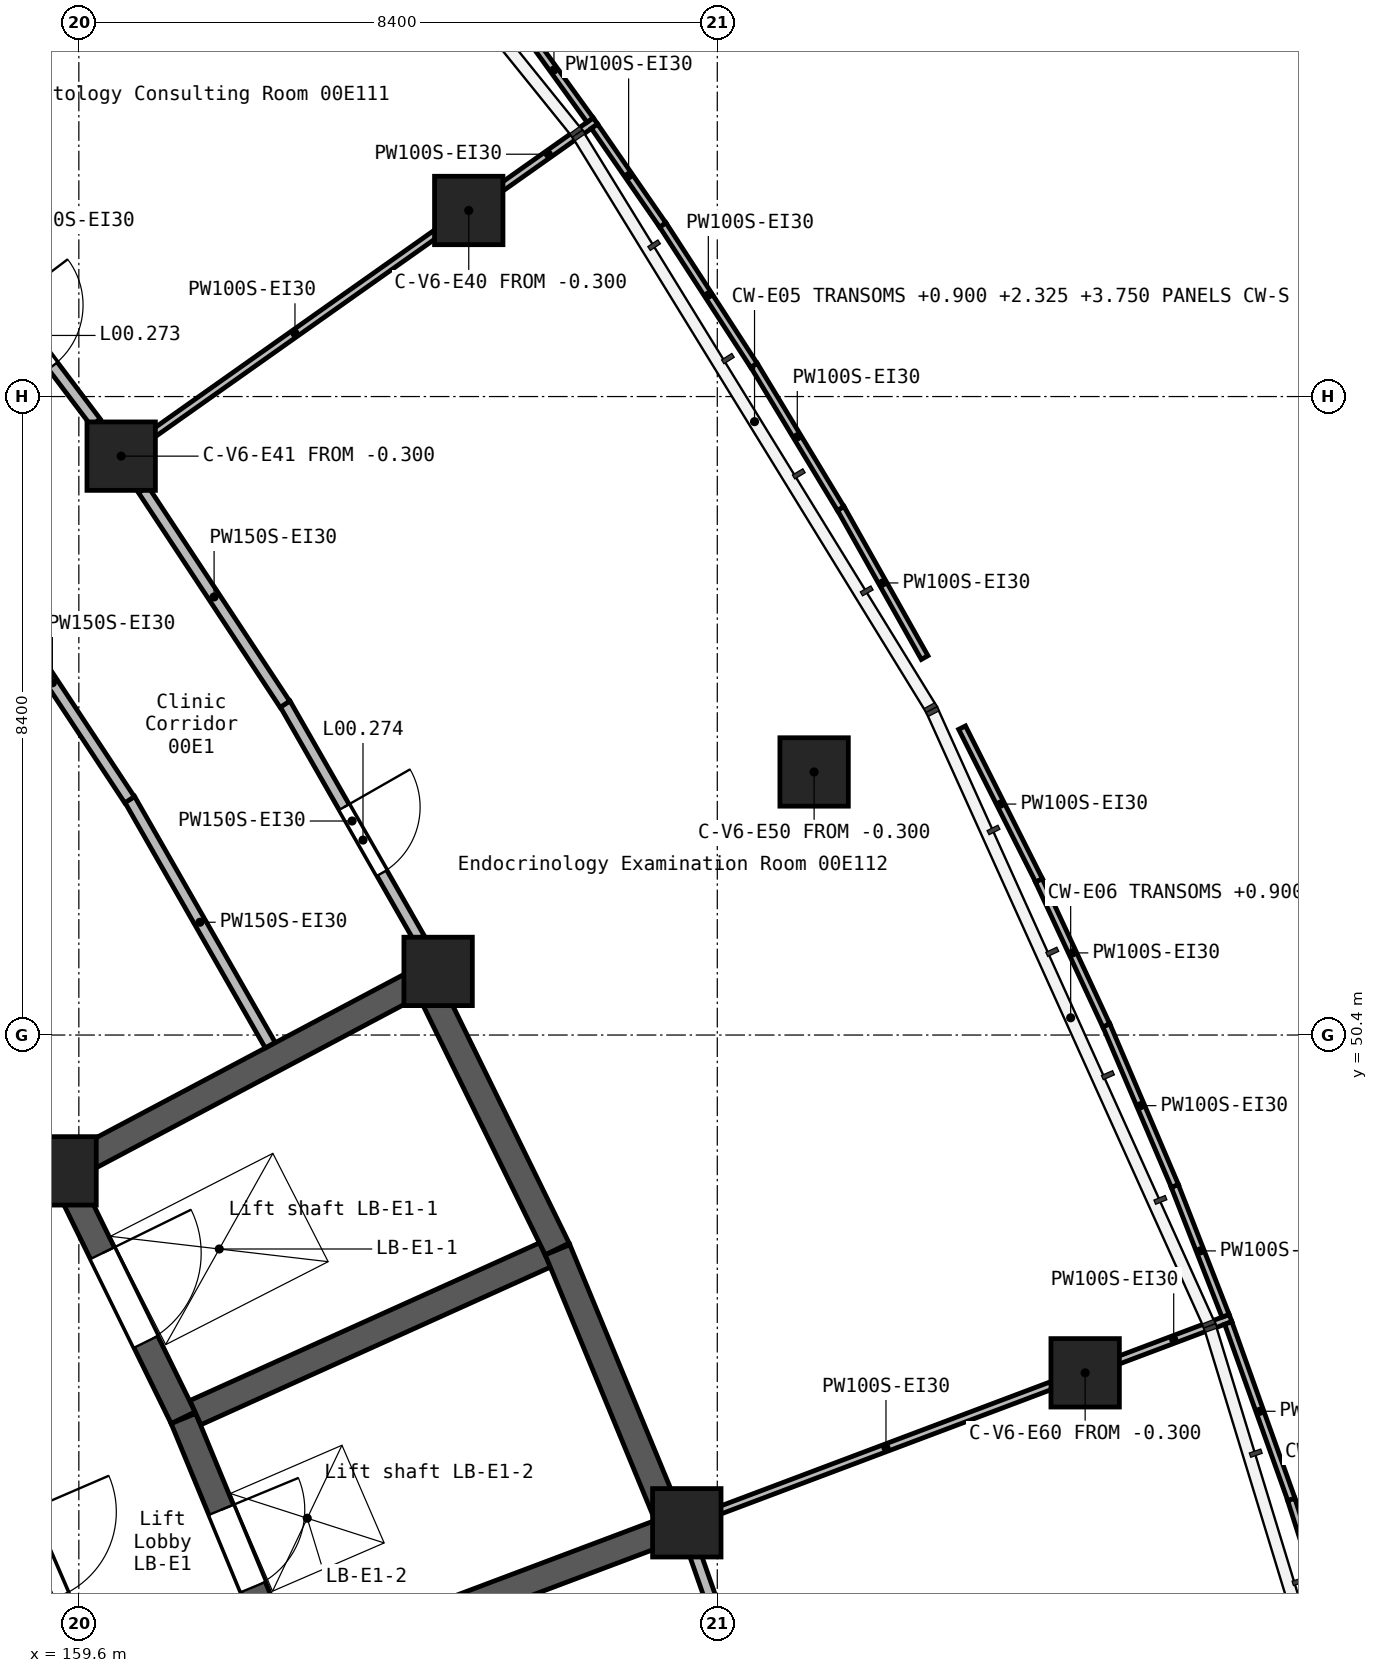
"""IFC4 building model, lengths in metres.
Left out: names, types, materials, properties, quantities, classifications, styles, units other than length and angle.
Written with IfcOpenShell. Run it as: python <this file> out.ifc"""

import sys

from ifc_helpers import new_model, si_unit, direction, frame, frame_2d, origin, origin_2d, place, context, subcontext, project, spatial, rectangle, extrude, element, fill, save


model = new_model("IFC4")
c1 = context("Model", 3, precision=1e-05, world=origin(), true_north=direction((0.0, 1.0)))
c2 = subcontext(c1, "Body", "Model", "MODEL_VIEW")
j1 = project(units=[si_unit("LENGTHUNIT", "METRE"), si_unit("PLANEANGLEUNIT", "RADIAN")], contexts=[c1])
p1 = place(None, origin())
s1 = spatial("IfcSite", under=j1, at=p1, CompositionType="ELEMENT")
p2 = place(p1, origin())
s2 = spatial("IfcBuilding", under=s1, at=p2, CompositionType="ELEMENT")
p3 = place(p2, origin())
s3 = spatial("IfcBuildingStorey", under=s2, at=p3, CompositionType="ELEMENT", Elevation=0.0)
for number, where, z_axis, x_axis in (
    (1, (159.379, 48.613, -0.3), (0.0, 0.0, 1.0), (1.0, 0.0, 0.0)),
    (2, (160.157, 58.016, -0.3), (0.0, 0.0, 1.0), (1.0, 0.0, 0.0)),
    (3, (164.327, 51.237, -0.3), (0.0, 0.0, 1.0), (1.0, 0.0, 0.0)),
    (4, (164.73, 61.248, -0.3), (0.0, 0.0, 1.0), (1.0, 0.0, 0.0)),
    (5, (167.599, 43.983, -0.3), (0.0, 0.0, 1.0), (1.0, 0.0, 0.0)),
    (6, (169.274, 53.861, -0.3), (0.0, 0.0, 1.0), (1.0, 0.0, 0.0)),
    (7, (172.84, 45.956, -0.3), (0.0, 0.0, 1.0), (1.0, 0.0, 0.0)),
):
    element("IfcColumn", number, at=place(p3, frame(where, z_axis=z_axis, x_axis=x_axis)), inside=s3, PredefinedType="COLUMN", context=c2, shape_type="SweptSolid", body=[
        extrude(rectangle(XDim=0.9, YDim=0.9, at=origin_2d()), origin(), (0.0, 0.0, 1.0), 5.7),
    ])
p4 = place(p3, frame((159.224, 48.531, -0.3), z_axis=(0.0, 0.0, 1.0), x_axis=(0.883393138637, 0.468632652094, 0.0)))
e8 = element("IfcWall", 8, at=p4, inside=s3, PredefinedType="SHEAR", context=c2, shape_type="SweptSolid", body=[
    extrude(rectangle(XDim=5.751, YDim=0.35, at=frame_2d((2.875, 0.0))), origin(), (0.0, 0.0, 1.0), 5.7),
])
p5 = place(p3, frame((159.456, 48.456, -0.3), z_axis=(0.0, 0.0, 1.0), x_axis=(0.440221126053, -0.89788939195, 0.0)))
e9 = element("IfcWall", 9, at=p5, inside=s3, PredefinedType="SHEAR", context=c2, shape_type="SweptSolid", body=[
    extrude(rectangle(XDim=3.442, YDim=0.35, at=frame_2d((1.721, 0.0))), origin(), (0.0, 0.0, 1.0), 5.7),
])
p6 = place(p5, frame((1.031, 0.0, 0.3)))
e10 = element("IfcOpeningElement", 10, at=p6, cuts=e9, PredefinedType="OPENING", context=c2, shape_type="SweptSolid", body=[
    extrude(rectangle(XDim=1.3, YDim=2.1, at=frame_2d((0.65, 1.05))), frame((0.0, 0.185, 0.0), z_axis=(0.0, -1.0, 0.0), x_axis=(1.0, 0.0, 0.0)), (0.0, 0.0, 1.0), 0.37),
])
p7 = place(p3, frame((160.976, 45.355, -0.3), z_axis=(0.0, 0.0, 1.0), x_axis=(0.381990591944, -0.924166212143, 0.0)))
e11 = element("IfcWall", 11, at=p7, inside=s3, PredefinedType="SHEAR", context=c2, shape_type="SweptSolid", body=[
    extrude(rectangle(XDim=3.443, YDim=0.35, at=frame_2d((1.721, 0.0))), origin(), (0.0, 0.0, 1.0), 5.7),
])
p8 = place(p7, frame((1.3, 0.0, 0.3)))
e12 = element("IfcOpeningElement", 12, at=p8, cuts=e11, PredefinedType="OPENING", context=c2, shape_type="SweptSolid", body=[
    extrude(rectangle(XDim=1.1, YDim=2.1, at=frame_2d((0.55, 1.05))), frame((0.0, 0.185, 0.0), z_axis=(0.0, -1.0, 0.0), x_axis=(1.0, 0.0, 0.0)), (0.0, 0.0, 1.0), 0.37),
])
p9 = place(p3, frame((161.134, 45.432, -0.3), z_axis=(0.0, 0.0, 1.0), x_axis=(0.911564728385, 0.411156595427, 0.0)))
e13 = element("IfcWall", 13, at=p9, inside=s3, PredefinedType="SHEAR", context=c2, shape_type="SweptSolid", body=[
    extrude(rectangle(XDim=5.05, YDim=0.35, at=frame_2d((2.525, 0.0))), origin(), (0.0, 0.0, 1.0), 5.7),
])
p10 = place(p3, frame((162.194, 41.949, -0.3), z_axis=(0.0, 0.0, 1.0), x_axis=(0.935920223106, 0.352212061095, 0.0)))
e14 = element("IfcWall", 14, at=p10, inside=s3, PredefinedType="SHEAR", context=c2, shape_type="SweptSolid", body=[
    extrude(rectangle(XDim=5.75, YDim=0.35, at=frame_2d((2.875, 0.0))), origin(), (0.0, 0.0, 1.0), 5.7),
])
p11 = place(p3, frame((165.894, 47.585, -0.3), z_axis=(0.0, 0.0, 1.0), x_axis=(-0.43992897418, 0.898032570499, 0.0)))
e15 = element("IfcWall", 15, at=p11, inside=s3, PredefinedType="SHEAR", context=c2, shape_type="SweptSolid", body=[
    extrude(rectangle(XDim=3.788, YDim=0.35, at=frame_2d((1.894, 0.0))), origin(), (0.0, 0.0, 1.0), 5.7),
])
p12 = place(p3, frame((167.345, 44.075, -0.3), z_axis=(0.0, 0.0, 1.0), x_axis=(-0.382046231428, 0.924143212415, 0.0)))
e16 = element("IfcWall", 16, at=p12, inside=s3, PredefinedType="SHEAR", context=c2, shape_type="SweptSolid", body=[
    extrude(rectangle(XDim=3.788, YDim=0.35, at=frame_2d((1.894, 0.0))), origin(), (0.0, 0.0, 1.0), 5.7),
])
p13 = place(p3, frame((158.747, 44.465, 0.0), z_axis=(0.0, 0.0, 1.0), x_axis=(0.396322487651, -0.918111368943, 0.0)))
e17 = element("IfcWall", 17, at=p13, inside=s3, PredefinedType="SOLIDWALL", context=c2, shape_type="SweptSolid", body=[
    extrude(rectangle(XDim=1.936, YDim=0.2, at=frame_2d((0.968, 0.0))), origin(), (0.0, 0.0, 1.0), 5.05),
])
p14 = place(p13, frame((0.368, 0.0, 0.0)))
e18 = element("IfcOpeningElement", 18, at=p14, cuts=e17, PredefinedType="OPENING", context=c2, shape_type="SweptSolid", body=[
    extrude(rectangle(XDim=1.2, YDim=2.1, at=frame_2d((0.6, 1.05))), frame((0.0, 0.11, 0.0), z_axis=(0.0, -1.0, 0.0), x_axis=(1.0, 0.0, 0.0)), (0.0, 0.0, 1.0), 0.22),
])
p15 = place(p3, frame((162.313, 54.758, 0.0), z_axis=(0.0, 0.0, 1.0), x_axis=(0.496582798362, -0.867989357291, 0.0)))
e19 = element("IfcWall", 19, at=p15, inside=s3, PredefinedType="PARTITIONING", context=c2, shape_type="SweptSolid", body=[
    extrude(rectangle(XDim=3.553, YDim=0.15, at=frame_2d((1.777, 0.0))), origin(), (0.0, 0.0, 1.0), 5.05),
])
p16 = place(p15, frame((1.566, 0.0, 0.0)))
e20 = element("IfcOpeningElement", 20, at=p16, cuts=e19, PredefinedType="OPENING", context=c2, shape_type="SweptSolid", body=[
    extrude(rectangle(XDim=1.0, YDim=2.1, at=frame_2d((0.5, 1.05))), frame((0.0, 0.085, 0.0), z_axis=(0.0, -1.0, 0.0), x_axis=(1.0, 0.0, 0.0)), (0.0, 0.0, 1.0), 0.17),
])
p17 = place(p3, frame((160.448, 57.575, 0.0), z_axis=(0.0, 0.0, 1.0), x_axis=(0.550814058929, -0.834627984485, 0.0)))
e21 = element("IfcWall", 21, at=p17, inside=s3, PredefinedType="PARTITIONING", context=c2, shape_type="SweptSolid", body=[
    extrude(rectangle(XDim=3.383, YDim=0.15, at=frame_2d((1.692, 0.0))), origin(), (0.0, 0.0, 1.0), 5.05),
])
p18 = place(p3, frame((157.712, 61.252, 0.0), z_axis=(0.0, 0.0, 1.0), x_axis=(0.602876520925, -0.797834506974, 0.0)))
e22 = element("IfcWall", 22, at=p18, inside=s3, PredefinedType="PARTITIONING", context=c2, shape_type="SweptSolid", body=[
    extrude(rectangle(XDim=3.499, YDim=0.15, at=frame_2d((1.75, 0.0))), origin(), (0.0, 0.0, 1.0), 5.05),
])
p19 = place(p18, frame((1.565, 0.0, 0.0)))
e23 = element("IfcOpeningElement", 23, at=p19, cuts=e22, PredefinedType="OPENING", context=c2, shape_type="SweptSolid", body=[
    extrude(rectangle(XDim=1.0, YDim=2.1, at=frame_2d((0.5, 1.05))), frame((0.0, 0.085, 0.0), z_axis=(0.0, -1.0, 0.0), x_axis=(1.0, 0.0, 0.0)), (0.0, 0.0, 1.0), 0.17),
])
p20 = place(p3, frame((167.711, 43.559, 0.0), z_axis=(0.0, 0.0, 1.0), x_axis=(0.330491338893, -0.9438090246, 0.0)))
e24 = element("IfcWall", 24, at=p20, inside=s3, PredefinedType="PARTITIONING", context=c2, shape_type="SweptSolid", body=[
    extrude(rectangle(XDim=3.473, YDim=0.15, at=frame_2d((1.736, 0.0))), origin(), (0.0, 0.0, 1.0), 5.05),
])
p21 = place(p3, frame((160.269, 53.501, 0.0), z_axis=(0.0, 0.0, 1.0), x_axis=(0.496371795626, -0.8681100394, 0.0)))
e25 = element("IfcWall", 25, at=p21, inside=s3, PredefinedType="PARTITIONING", context=c2, shape_type="SweptSolid", body=[
    extrude(rectangle(XDim=3.726, YDim=0.15, at=frame_2d((1.863, 0.0))), origin(), (0.0, 0.0, 1.0), 5.05),
])
p22 = place(p3, frame((158.236, 56.571, 0.0), z_axis=(0.0, 0.0, 1.0), x_axis=(0.550996276136, -0.834507701393, 0.0)))
e26 = element("IfcWall", 26, at=p22, inside=s3, PredefinedType="PARTITIONING", context=c2, shape_type="SweptSolid", body=[
    extrude(rectangle(XDim=3.687, YDim=0.15, at=frame_2d((1.843, 0.0))), origin(), (0.0, 0.0, 1.0), 5.05),
])
p23 = place(p3, frame((168.016, 44.14, 0.0), z_axis=(0.0, 0.0, 1.0), x_axis=(0.935850976525, 0.352396012659, 0.0)))
e27 = element("IfcWall", 27, at=p23, inside=s3, PredefinedType="PARTITIONING", context=c2, shape_type="SweptSolid", body=[
    extrude(rectangle(XDim=4.708, YDim=0.1, at=frame_2d((2.354, 0.0))), origin(), (0.0, 0.0, 1.0), 5.05),
])
p24 = place(p3, frame((173.257, 46.114, 0.0), z_axis=(0.0, 0.0, 1.0), x_axis=(0.93586999438, 0.35234550319, 0.0)))
e28 = element("IfcWall", 28, at=p24, inside=s3, PredefinedType="PARTITIONING", context=c2, shape_type="SweptSolid", body=[
    extrude(rectangle(XDim=1.598, YDim=0.1, at=frame_2d((0.799, 0.0))), origin(), (0.0, 0.0, 1.0), 5.05),
])
p25 = place(p3, frame((160.585, 58.319, 0.0), z_axis=(0.0, 0.0, 1.0), x_axis=(0.816630246187, 0.577161191534, 0.0)))
e29 = element("IfcWall", 29, at=p25, inside=s3, PredefinedType="PARTITIONING", context=c2, shape_type="SweptSolid", body=[
    extrude(rectangle(XDim=4.551, YDim=0.1, at=frame_2d((2.275, 0.0))), origin(), (0.0, 0.0, 1.0), 5.05),
])
p26 = place(p3, frame((165.158, 61.551, 0.0), z_axis=(0.0, 0.0, 1.0), x_axis=(0.816659911288, 0.577119215842, 0.0)))
e30 = element("IfcWall", 30, at=p26, inside=s3, PredefinedType="PARTITIONING", context=c2, shape_type="SweptSolid", body=[
    extrude(rectangle(XDim=1.517, YDim=0.1, at=frame_2d((0.758, 0.0))), origin(), (0.0, 0.0, 1.0), 5.05),
])
p27 = place(p3, frame((174.723, 46.611, 0.0), z_axis=(0.0, 0.0, 1.0), x_axis=(0.336762779461, -0.94158952329, 0.0)))
e31 = element("IfcWall", 31, at=p27, inside=s3, PredefinedType="PARTITIONING", context=c2, shape_type="SweptSolid", body=[
    extrude(rectangle(XDim=2.466, YDim=0.1, at=frame_2d((1.233, 0.0))), origin(), (0.0, 0.0, 1.0), 5.05),
])
p28 = place(p3, frame((169.624, 57.33, 0.0), z_axis=(0.0, 0.0, 1.0), x_axis=(0.490245804698, -0.871584219095, 0.0)))
e32 = element("IfcWall", 32, at=p28, inside=s3, PredefinedType="PARTITIONING", context=c2, shape_type="SweptSolid", body=[
    extrude(rectangle(XDim=2.253, YDim=0.1, at=frame_2d((1.126, 0.0))), origin(), (0.0, 0.0, 1.0), 5.05),
])
p29 = place(p3, frame((168.482, 59.213, 0.0), z_axis=(0.0, 0.0, 1.0), x_axis=(0.517604223091, -0.855620165867, 0.0)))
e33 = element("IfcWall", 33, at=p29, inside=s3, PredefinedType="PARTITIONING", context=c2, shape_type="SweptSolid", body=[
    extrude(rectangle(XDim=2.204, YDim=0.1, at=frame_2d((1.102, 0.0))), origin(), (0.0, 0.0, 1.0), 5.05),
])
p30 = place(p3, frame((167.283, 61.059, 0.0), z_axis=(0.0, 0.0, 1.0), x_axis=(0.544248024884, -0.838924363342, 0.0)))
e34 = element("IfcWall", 34, at=p30, inside=s3, PredefinedType="PARTITIONING", context=c2, shape_type="SweptSolid", body=[
    extrude(rectangle(XDim=2.203, YDim=0.1, at=frame_2d((1.102, 0.0))), origin(), (0.0, 0.0, 1.0), 5.05),
])
p31 = place(p3, frame((171.221, 54.444, 0.0), z_axis=(0.0, 0.0, 1.0), x_axis=(0.449727785834, -0.893165672565, 0.0)))
e35 = element("IfcWall", 35, at=p31, inside=s3, PredefinedType="PARTITIONING", context=c2, shape_type="SweptSolid", body=[
    extrude(rectangle(XDim=2.251, YDim=0.1, at=frame_2d((1.125, 0.0))), origin(), (0.0, 0.0, 1.0), 5.05),
])
p32 = place(p3, frame((173.118, 50.529, 0.0), z_axis=(0.0, 0.0, 1.0), x_axis=(0.392535641105, -0.919736794122, 0.0)))
e36 = element("IfcWall", 36, at=p32, inside=s3, PredefinedType="PARTITIONING", context=c2, shape_type="SweptSolid", body=[
    extrude(rectangle(XDim=2.301, YDim=0.1, at=frame_2d((1.15, 0.0))), origin(), (0.0, 0.0, 1.0), 5.05),
])
p33 = place(p3, frame((175.552, 44.29, 0.0), z_axis=(0.0, 0.0, 1.0), x_axis=(0.304461914253, -0.952524510325, 0.0)))
e37 = element("IfcWall", 37, at=p33, inside=s3, PredefinedType="PARTITIONING", context=c2, shape_type="SweptSolid", body=[
    extrude(rectangle(XDim=2.202, YDim=0.1, at=frame_2d((1.101, 0.0))), origin(), (0.0, 0.0, 1.0), 5.05),
])
p34 = place(p3, frame((172.231, 52.434, 0.0), z_axis=(0.0, 0.0, 1.0), x_axis=(0.42144215668, -0.906855285353, 0.0)))
e38 = element("IfcWall", 38, at=p34, inside=s3, PredefinedType="PARTITIONING", context=c2, shape_type="SweptSolid", body=[
    extrude(rectangle(XDim=2.103, YDim=0.1, at=frame_2d((1.051, 0.0))), origin(), (0.0, 0.0, 1.0), 5.05),
])
p35 = place(p3, frame((174.02, 48.414, 0.0), z_axis=(0.0, 0.0, 1.0), x_axis=(0.364148326517, -0.931340966722, 0.0)))
e39 = element("IfcWall", 39, at=p35, inside=s3, PredefinedType="PARTITIONING", context=c2, shape_type="SweptSolid", body=[
    extrude(rectangle(XDim=1.834, YDim=0.1, at=frame_2d((0.917, 0.0))), origin(), (0.0, 0.0, 1.0), 5.05),
])
p36 = place(p3, frame((166.385, 62.355, 0.0), z_axis=(0.0, 0.0, 1.0), x_axis=(0.568646920536, -0.822581716163, 0.0)))
e40 = element("IfcWall", 40, at=p36, inside=s3, PredefinedType="PARTITIONING", context=c2, shape_type="SweptSolid", body=[
    extrude(rectangle(XDim=1.579, YDim=0.1, at=frame_2d((0.789, 0.0))), origin(), (0.0, 0.0, 1.0), 5.05),
])
p37 = place(p3, frame((165.375, 63.755, 0.0), z_axis=(0.0, 0.0, 1.0), x_axis=(0.585622227381, -0.810584114573, 0.0)))
e41 = element("IfcWall", 41, at=p37, inside=s3, PredefinedType="PARTITIONING", context=c2, shape_type="SweptSolid", body=[
    extrude(rectangle(XDim=1.625, YDim=0.1, at=frame_2d((0.812, 0.0))), origin(), (0.0, 0.0, 1.0), 5.05),
])
p38 = place(p14, origin())
e42 = element("IfcDoor", 42, at=p38, inside=s3, OperationType="SINGLE_SWING_LEFT", PredefinedType="DOOR", context=c2, shape_type="SweptSolid", body=[
    extrude(rectangle(XDim=1.2, YDim=2.1, at=frame_2d((0.6, 1.05))), frame((0.0, 0.025, 0.0), z_axis=(0.0, -1.0, 0.0), x_axis=(1.0, 0.0, 0.0)), (0.0, 0.0, 1.0), 0.05),
])
fill(e18, e42)
p39 = place(p19, origin())
e43 = element("IfcDoor", 43, at=p39, inside=s3, OperationType="SINGLE_SWING_RIGHT", PredefinedType="DOOR", context=c2, shape_type="SweptSolid", body=[
    extrude(rectangle(XDim=1.0, YDim=2.1, at=frame_2d((0.5, 1.05))), frame((0.0, 0.025, 0.0), z_axis=(0.0, -1.0, 0.0), x_axis=(1.0, 0.0, 0.0)), (0.0, 0.0, 1.0), 0.05),
])
fill(e23, e43)
p40 = place(p16, origin())
e44 = element("IfcDoor", 44, at=p40, inside=s3, OperationType="SINGLE_SWING_RIGHT", PredefinedType="DOOR", context=c2, shape_type="SweptSolid", body=[
    extrude(rectangle(XDim=1.0, YDim=2.1, at=frame_2d((0.5, 1.05))), frame((0.0, 0.025, 0.0), z_axis=(0.0, -1.0, 0.0), x_axis=(1.0, 0.0, 0.0)), (0.0, 0.0, 1.0), 0.05),
])
fill(e20, e44)
p41 = place(p6, origin())
e45 = element("IfcDoor", 45, at=p41, inside=s3, OperationType="DOUBLE_DOOR_SLIDING", PredefinedType="DOOR", context=c2, shape_type="SweptSolid", body=[
    extrude(rectangle(XDim=1.3, YDim=2.1, at=frame_2d((0.65, 1.05))), frame((0.0, 0.025, 0.0), z_axis=(0.0, -1.0, 0.0), x_axis=(1.0, 0.0, 0.0)), (0.0, 0.0, 1.0), 0.05),
])
fill(e10, e45)
p42 = place(p8, origin())
e46 = element("IfcDoor", 46, at=p42, inside=s3, OperationType="DOUBLE_DOOR_SLIDING", PredefinedType="DOOR", context=c2, shape_type="SweptSolid", body=[
    extrude(rectangle(XDim=1.1, YDim=2.1, at=frame_2d((0.55, 1.05))), frame((0.0, 0.025, 0.0), z_axis=(0.0, -1.0, 0.0), x_axis=(1.0, 0.0, 0.0)), (0.0, 0.0, 1.0), 0.05),
])
fill(e12, e46)
save(model, sys.argv[1])
